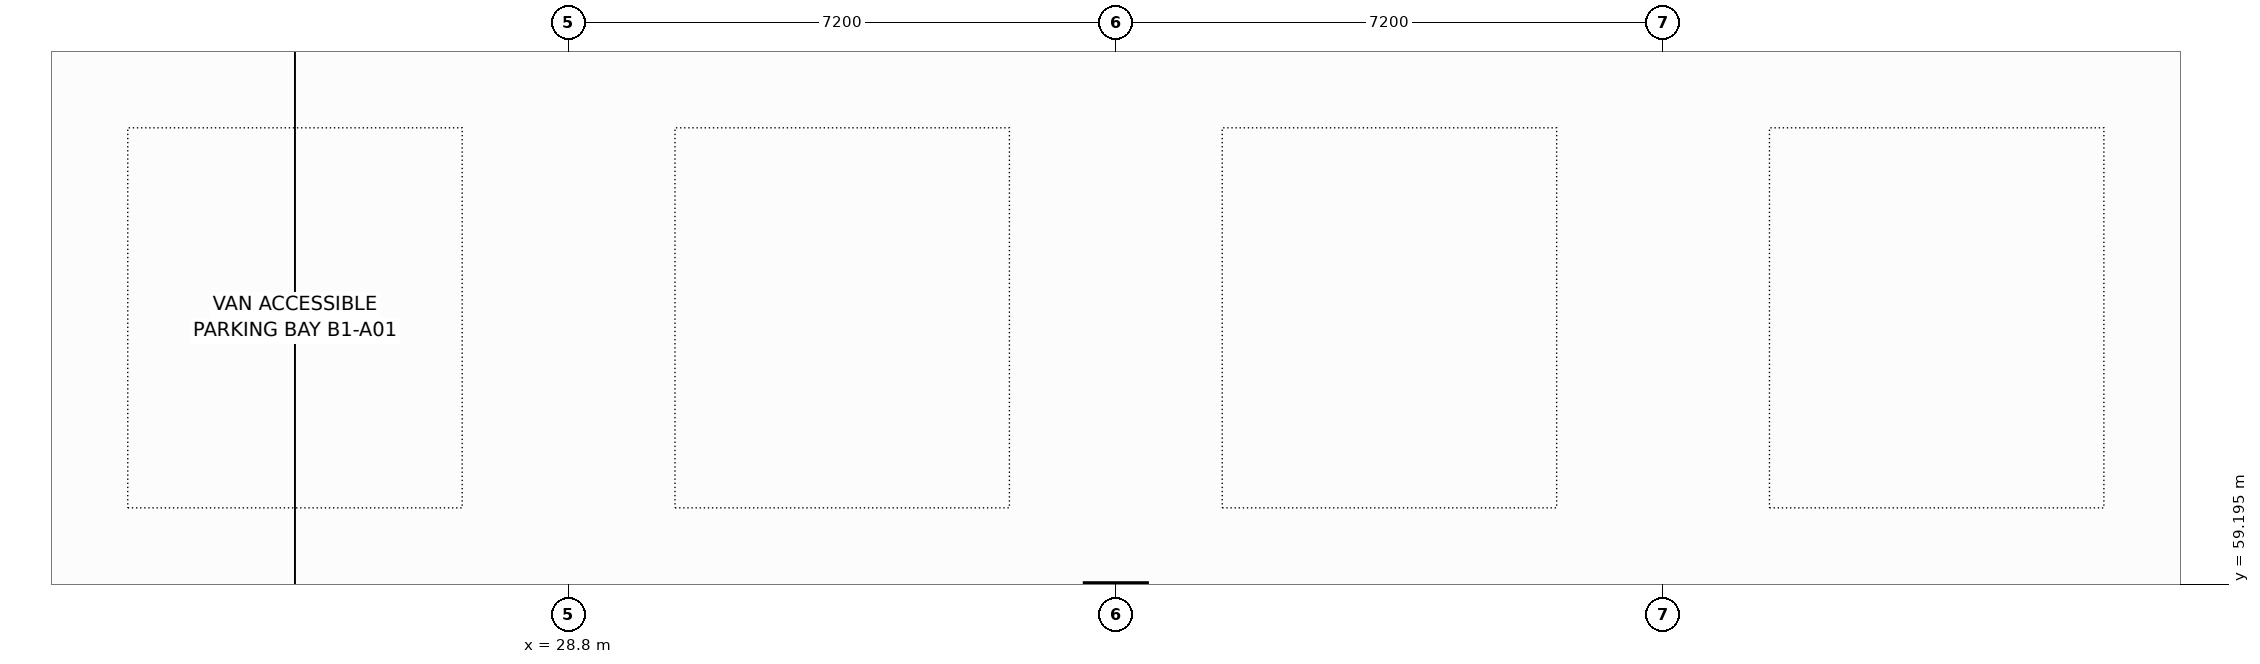
"""IFC4 building model, lengths in metres.
Left out: names, types, materials, properties, quantities, classifications, styles, units other than length and angle.
Written with IfcOpenShell. Run it as: python <this file> out.ifc"""

import sys

from ifc_helpers import new_model, si_unit, direction, frame, origin, origin_2d, place, context, subcontext, project, spatial, rectangle, extrude, element, save


model = new_model("IFC4")
c1 = context("Model", 3, precision=1e-05, world=origin(), true_north=direction((0.0, 1.0)))
c2 = subcontext(c1, "Body", "Model", "MODEL_VIEW")
j1 = project(units=[si_unit("LENGTHUNIT", "METRE"), si_unit("PLANEANGLEUNIT", "RADIAN")], contexts=[c1])
p1 = place(None, origin())
s1 = spatial("IfcSite", under=j1, at=p1, CompositionType="ELEMENT")
p2 = place(p1, origin())
s2 = spatial("IfcBuilding", under=s1, at=p2, CompositionType="ELEMENT")
p3 = place(p2, frame((0.0, 0.0, -4.2)))
s3 = spatial("IfcBuildingStorey", under=s2, at=p3, CompositionType="ELEMENT", Elevation=-4.2)
p4 = place(p3, frame((36.0, 58.8, 0.0), z_axis=(0.0, 0.0, 1.0), x_axis=(1.0, 0.0, 0.0)))
e1 = element("IfcColumn", 1, at=p4, inside=s3, PredefinedType="COLUMN", context=c2, shape_type="SweptSolid", body=[
    extrude(rectangle(XDim=0.8, YDim=0.8, at=origin_2d()), origin(), (0.0, 0.0, 1.0), 4.2),
])
save(model, sys.argv[1])
